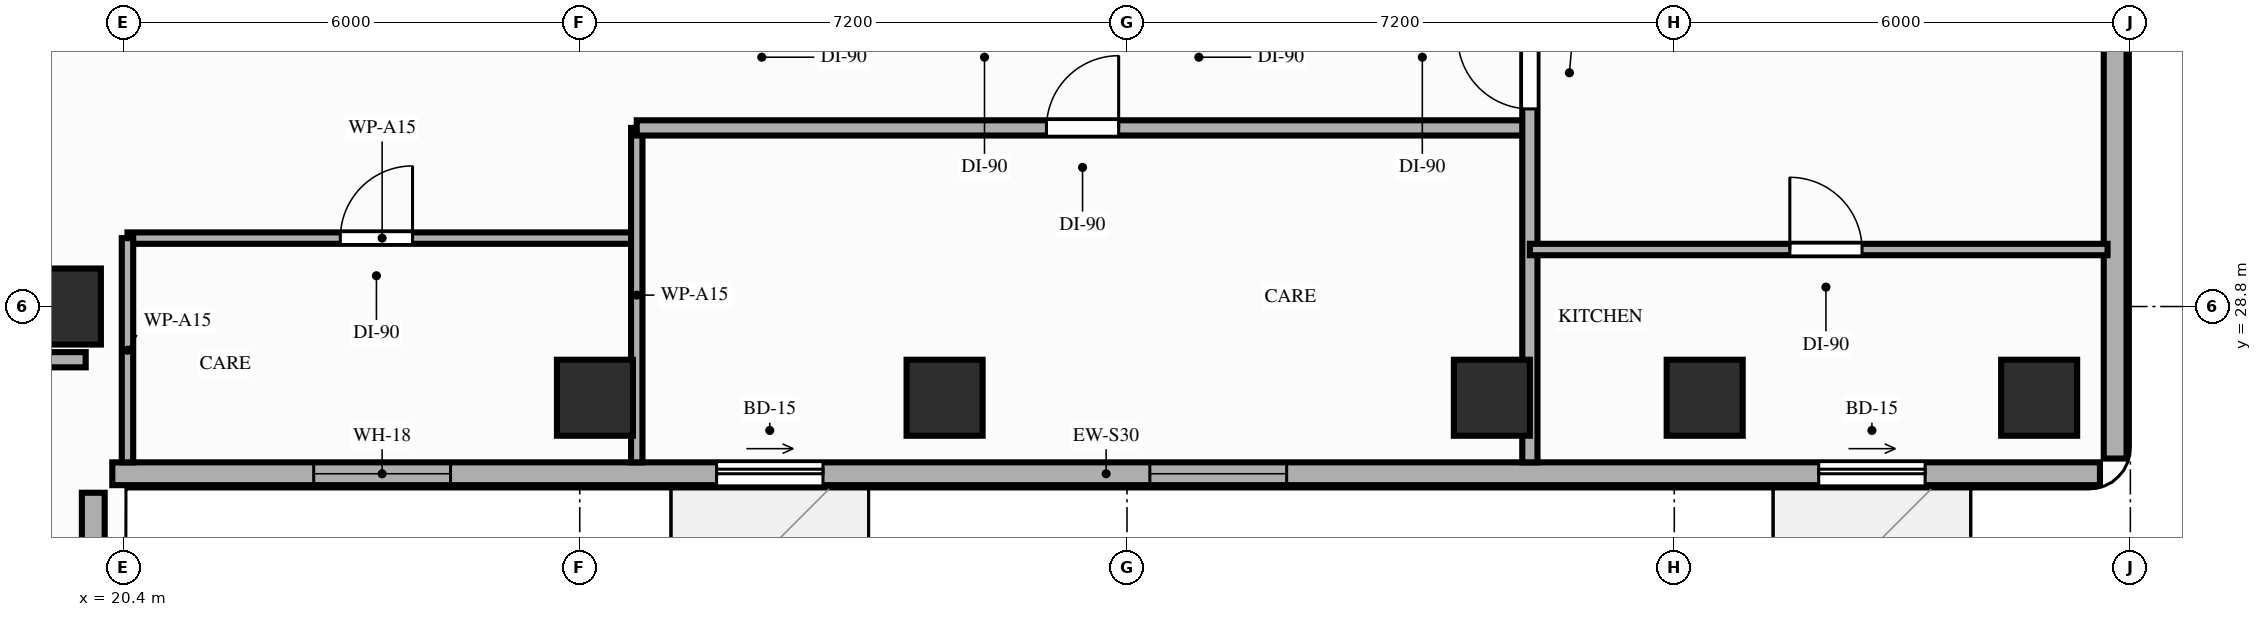
"""IFC4 building model, lengths in metres.
Left out: names, types, materials, properties, quantities, classifications, styles, units other than length and angle.
Written with IfcOpenShell. Run it as: python <this file> out.ifc"""

import sys

from ifc_helpers import new_model, si_unit, direction, frame, frame_2d, origin, origin_2d, place, context, subcontext, project, spatial, rectangle, extrude, element, fill, save


model = new_model("IFC4")
c1 = context("Model", 3, precision=1e-05, world=origin(), true_north=direction((0.0, 1.0)))
c2 = subcontext(c1, "Body", "Model", "MODEL_VIEW")
j1 = project(units=[si_unit("LENGTHUNIT", "METRE"), si_unit("PLANEANGLEUNIT", "RADIAN")], contexts=[c1])
p1 = place(None, origin())
s1 = spatial("IfcSite", under=j1, at=p1, CompositionType="ELEMENT")
p2 = place(p1, origin())
s2 = spatial("IfcBuilding", under=s1, at=p2, CompositionType="ELEMENT")
p3 = place(p2, frame((0.0, 0.0, 133.0)))
s3 = spatial("IfcBuildingStorey", under=s2, at=p3, CompositionType="ELEMENT", Elevation=133.0)
for number, where, z_axis, x_axis in (
    (1, (19.6, 28.8, 0.0), (0.0, 0.0, 1.0), (1.0, 0.0, 0.0)),
    (2, (26.6, 27.6, 0.0), (0.0, 0.0, 1.0), (1.0, 0.0, 0.0)),
    (3, (31.2, 27.6, 0.0), (0.0, 0.0, 1.0), (1.0, 0.0, 0.0)),
    (4, (38.4, 27.6, 0.0), (0.0, 0.0, 1.0), (1.0, 0.0, 0.0)),
    (5, (41.2, 27.6, 0.0), (0.0, 0.0, 1.0), (1.0, 0.0, 0.0)),
    (6, (45.6, 27.6, 0.0), (0.0, 0.0, 1.0), (1.0, 0.0, 0.0)),
):
    element("IfcColumn", number, at=place(p3, frame(where, z_axis=z_axis, x_axis=x_axis)), inside=s3, PredefinedType="COLUMN", context=c2, shape_type="SweptSolid", body=[
        extrude(rectangle(XDim=1.0, YDim=1.0, at=origin_2d()), origin(), (0.0, 0.0, 1.0), 3.2),
    ])
p4 = place(p3, frame((20.0, 8.8, 0.0), z_axis=(0.0, 0.0, 1.0), x_axis=(0.0, 1.0, 0.0)))
e7 = element("IfcWall", 7, at=p4, inside=s3, PredefinedType="STANDARD", context=c2, shape_type="SweptSolid", body=[
    extrude(rectangle(XDim=17.55, YDim=0.3, at=frame_2d((8.775, 0.0))), origin(), (0.0, 0.0, 1.0), 2.46),
])
p5 = place(p4, frame((10.32, 0.0, 0.85)))
e8 = element("IfcOpeningElement", 8, at=p5, cuts=e7, PredefinedType="OPENING", context=c2, shape_type="SweptSolid", body=[
    extrude(rectangle(XDim=1.8, YDim=1.36, at=frame_2d((0.9, 0.68))), frame((0.0, 0.16, 0.0), z_axis=(0.0, -1.0, 0.0), x_axis=(1.0, 0.0, 0.0)), (0.0, 0.0, 1.0), 0.32),
])
p6 = place(p3, frame((20.25, 26.6, 0.0), z_axis=(0.0, 0.0, 1.0), x_axis=(1.0, 0.0, 0.0)))
e9 = element("IfcWall", 9, at=p6, inside=s3, PredefinedType="STANDARD", context=c2, shape_type="SweptSolid", body=[
    extrude(rectangle(XDim=26.15, YDim=0.3, at=frame_2d((13.075, 0.0))), origin(), (0.0, 0.0, 1.0), 2.71),
])
p7 = place(p6, frame((7.95, 0.0, 0.0)))
e10 = element("IfcOpeningElement", 10, at=p7, cuts=e9, PredefinedType="OPENING", context=c2, shape_type="SweptSolid", body=[
    extrude(rectangle(XDim=1.4, YDim=2.1, at=frame_2d((0.7, 1.05))), frame((0.0, 0.16, 0.0), z_axis=(0.0, -1.0, 0.0), x_axis=(1.0, 0.0, 0.0)), (0.0, 0.0, 1.0), 0.32),
])
p8 = place(p6, frame((22.45, 0.0, 0.0)))
e11 = element("IfcOpeningElement", 11, at=p8, cuts=e9, PredefinedType="OPENING", context=c2, shape_type="SweptSolid", body=[
    extrude(rectangle(XDim=1.4, YDim=2.1, at=frame_2d((0.7, 1.05))), frame((0.0, 0.16, 0.0), z_axis=(0.0, -1.0, 0.0), x_axis=(1.0, 0.0, 0.0)), (0.0, 0.0, 1.0), 0.32),
])
p9 = place(p6, frame((2.65, 0.0, 0.85)))
e12 = element("IfcOpeningElement", 12, at=p9, cuts=e9, PredefinedType="OPENING", context=c2, shape_type="SweptSolid", body=[
    extrude(rectangle(XDim=1.8, YDim=1.61, at=frame_2d((0.9, 0.805))), frame((0.0, 0.16, 0.0), z_axis=(0.0, -1.0, 0.0), x_axis=(1.0, 0.0, 0.0)), (0.0, 0.0, 1.0), 0.32),
])
p10 = place(p6, frame((13.65, 0.0, 0.85)))
e13 = element("IfcOpeningElement", 13, at=p10, cuts=e9, PredefinedType="OPENING", context=c2, shape_type="SweptSolid", body=[
    extrude(rectangle(XDim=1.8, YDim=1.61, at=frame_2d((0.9, 0.805))), frame((0.0, 0.16, 0.0), z_axis=(0.0, -1.0, 0.0), x_axis=(1.0, 0.0, 0.0)), (0.0, 0.0, 1.0), 0.32),
])
p11 = place(p3, frame((46.6, 26.8, 0.0), z_axis=(0.0, 0.0, 1.0), x_axis=(0.0, 1.0, 0.0)))
e14 = element("IfcWall", 14, at=p11, inside=s3, PredefinedType="STANDARD", context=c2, shape_type="SweptSolid", body=[
    extrude(rectangle(XDim=15.35, YDim=0.3, at=frame_2d((7.675, 0.0))), origin(), (0.0, 0.0, 1.0), 3.02),
])
p12 = place(p11, frame((6.13, 0.0, 0.85)))
e15 = element("IfcOpeningElement", 15, at=p12, cuts=e14, PredefinedType="OPENING", context=c2, shape_type="SweptSolid", body=[
    extrude(rectangle(XDim=1.8, YDim=1.75, at=frame_2d((0.9, 0.875))), frame((0.0, 0.16, 0.0), z_axis=(0.0, -1.0, 0.0), x_axis=(1.0, 0.0, 0.0)), (0.0, 0.0, 1.0), 0.32),
])
p13 = place(p3, frame((12.91, 28.1, 0.0), z_axis=(0.0, 0.0, 1.0), x_axis=(1.0, 0.0, 0.0)))
e16 = element("IfcWall", 16, at=p13, inside=s3, PredefinedType="PARTITIONING", context=c2, shape_type="SweptSolid", body=[
    extrude(rectangle(XDim=6.99, YDim=0.2, at=frame_2d((3.495, 0.0))), origin(), (0.0, 0.0, 1.0), 2.46),
])
p14 = place(p3, frame((20.45, 29.7, 0.0), z_axis=(0.0, 0.0, 1.0), x_axis=(1.0, 0.0, 0.0)))
e17 = element("IfcWall", 17, at=p14, inside=s3, PredefinedType="PARTITIONING", context=c2, shape_type="SweptSolid", body=[
    extrude(rectangle(XDim=6.7, YDim=0.15, at=frame_2d((3.35, 0.0))), origin(), (0.0, 0.0, 1.0), 3.02),
])
p15 = place(p14, frame((2.8, 0.0, 0.0)))
e18 = element("IfcOpeningElement", 18, at=p15, cuts=e17, PredefinedType="OPENING", context=c2, shape_type="SweptSolid", body=[
    extrude(rectangle(XDim=0.95, YDim=2.15, at=frame_2d((0.475, 1.075))), frame((0.0, 0.085, 0.0), z_axis=(0.0, -1.0, 0.0), x_axis=(1.0, 0.0, 0.0)), (0.0, 0.0, 1.0), 0.17),
])
p16 = place(p3, frame((20.45, 26.75, 0.0), z_axis=(0.0, 0.0, 1.0), x_axis=(0.0, 1.0, 0.0)))
e19 = element("IfcWall", 19, at=p16, inside=s3, PredefinedType="PARTITIONING", context=c2, shape_type="SweptSolid", body=[
    extrude(rectangle(XDim=2.95, YDim=0.15, at=frame_2d((1.475, 0.0))), origin(), (0.0, 0.0, 1.0), 2.46),
])
p17 = place(p3, frame((27.15, 26.75, 0.0), z_axis=(0.0, 0.0, 1.0), x_axis=(0.0, 1.0, 0.0)))
e20 = element("IfcWall", 20, at=p17, inside=s3, PredefinedType="PARTITIONING", context=c2, shape_type="SweptSolid", body=[
    extrude(rectangle(XDim=4.4, YDim=0.15, at=frame_2d((2.2, 0.0))), origin(), (0.0, 0.0, 1.0), 2.46),
])
p18 = place(p3, frame((27.15, 31.15, 0.0), z_axis=(0.0, 0.0, 1.0), x_axis=(1.0, 0.0, 0.0)))
e21 = element("IfcWall", 21, at=p18, inside=s3, PredefinedType="PARTITIONING", context=c2, shape_type="SweptSolid", body=[
    extrude(rectangle(XDim=11.75, YDim=0.2, at=frame_2d((5.875, 0.0))), origin(), (0.0, 0.0, 1.0), 2.46),
])
p19 = place(p18, frame((5.39, 0.0, 0.0)))
e22 = element("IfcOpeningElement", 22, at=p19, cuts=e21, PredefinedType="OPENING", context=c2, shape_type="SweptSolid", body=[
    extrude(rectangle(XDim=0.95, YDim=2.15, at=frame_2d((0.475, 1.075))), frame((0.0, 0.11, 0.0), z_axis=(0.0, -1.0, 0.0), x_axis=(1.0, 0.0, 0.0)), (0.0, 0.0, 1.0), 0.22),
])
p20 = place(p3, frame((38.9, 26.75, 0.0), z_axis=(0.0, 0.0, 1.0), x_axis=(0.0, 1.0, 0.0)))
e23 = element("IfcWall", 23, at=p20, inside=s3, PredefinedType="PARTITIONING", context=c2, shape_type="SweptSolid", body=[
    extrude(rectangle(XDim=15.45, YDim=0.2, at=frame_2d((7.725, 0.0))), origin(), (0.0, 0.0, 1.0), 2.46),
])
p21 = place(p20, frame((4.65, 0.0, 0.0)))
e24 = element("IfcOpeningElement", 24, at=p21, cuts=e23, PredefinedType="OPENING", context=c2, shape_type="SweptSolid", body=[
    extrude(rectangle(XDim=0.95, YDim=2.15, at=frame_2d((0.475, 1.075))), frame((0.0, 0.11, 0.0), z_axis=(0.0, -1.0, 0.0), x_axis=(1.0, 0.0, 0.0)), (0.0, 0.0, 1.0), 0.22),
])
p22 = place(p3, frame((38.9, 29.55, 0.0), z_axis=(0.0, 0.0, 1.0), x_axis=(1.0, 0.0, 0.0)))
e25 = element("IfcWall", 25, at=p22, inside=s3, PredefinedType="PARTITIONING", context=c2, shape_type="SweptSolid", body=[
    extrude(rectangle(XDim=7.6, YDim=0.15, at=frame_2d((3.8, 0.0))), origin(), (0.0, 0.0, 1.0), 2.46),
])
p23 = place(p22, frame((3.42, 0.0, 0.0)))
e26 = element("IfcOpeningElement", 26, at=p23, cuts=e25, PredefinedType="OPENING", context=c2, shape_type="SweptSolid", body=[
    extrude(rectangle(XDim=0.95, YDim=2.15, at=frame_2d((0.475, 1.075))), frame((0.0, 0.085, 0.0), z_axis=(0.0, -1.0, 0.0), x_axis=(1.0, 0.0, 0.0)), (0.0, 0.0, 1.0), 0.17),
])
p24 = place(p7, origin())
e27 = element("IfcDoor", 27, at=p24, inside=s3, OperationType="SLIDING_TO_RIGHT", PredefinedType="DOOR", context=c2, shape_type="SweptSolid", body=[
    extrude(rectangle(XDim=1.4, YDim=2.1, at=frame_2d((0.7, 1.05))), frame((0.0, 0.025, 0.0), z_axis=(0.0, -1.0, 0.0), x_axis=(1.0, 0.0, 0.0)), (0.0, 0.0, 1.0), 0.05),
])
fill(e10, e27)
p25 = place(p8, origin())
e28 = element("IfcDoor", 28, at=p25, inside=s3, OperationType="SLIDING_TO_RIGHT", PredefinedType="DOOR", context=c2, shape_type="SweptSolid", body=[
    extrude(rectangle(XDim=1.4, YDim=2.1, at=frame_2d((0.7, 1.05))), frame((0.0, 0.025, 0.0), z_axis=(0.0, -1.0, 0.0), x_axis=(1.0, 0.0, 0.0)), (0.0, 0.0, 1.0), 0.05),
])
fill(e11, e28)
p26 = place(p9, origin())
e29 = element("IfcWindow", 29, at=p26, inside=s3, PartitioningType="SINGLE_PANEL", PredefinedType="WINDOW", context=c2, shape_type="SweptSolid", body=[
    extrude(rectangle(XDim=1.8, YDim=1.61, at=frame_2d((0.9, 0.805))), frame((0.0, 0.03, 0.0), z_axis=(0.0, -1.0, 0.0), x_axis=(1.0, 0.0, 0.0)), (0.0, 0.0, 1.0), 0.06),
])
fill(e12, e29)
p27 = place(p10, origin())
e30 = element("IfcWindow", 30, at=p27, inside=s3, PartitioningType="SINGLE_PANEL", PredefinedType="WINDOW", context=c2, shape_type="SweptSolid", body=[
    extrude(rectangle(XDim=1.8, YDim=1.61, at=frame_2d((0.9, 0.805))), frame((0.0, 0.03, 0.0), z_axis=(0.0, -1.0, 0.0), x_axis=(1.0, 0.0, 0.0)), (0.0, 0.0, 1.0), 0.06),
])
fill(e13, e30)
p28 = place(p15, origin())
e31 = element("IfcDoor", 31, at=p28, inside=s3, OperationType="SINGLE_SWING_RIGHT", PredefinedType="DOOR", context=c2, shape_type="SweptSolid", body=[
    extrude(rectangle(XDim=0.95, YDim=2.15, at=frame_2d((0.475, 1.075))), frame((0.0, 0.025, 0.0), z_axis=(0.0, -1.0, 0.0), x_axis=(1.0, 0.0, 0.0)), (0.0, 0.0, 1.0), 0.05),
])
fill(e18, e31)
p29 = place(p21, origin())
e32 = element("IfcDoor", 32, at=p29, inside=s3, OperationType="SINGLE_SWING_RIGHT", PredefinedType="DOOR", context=c2, shape_type="SweptSolid", body=[
    extrude(rectangle(XDim=0.95, YDim=2.15, at=frame_2d((0.475, 1.075))), frame((0.0, 0.025, 0.0), z_axis=(0.0, -1.0, 0.0), x_axis=(1.0, 0.0, 0.0)), (0.0, 0.0, 1.0), 0.05),
])
fill(e24, e32)
p30 = place(p23, origin())
e33 = element("IfcDoor", 33, at=p30, inside=s3, OperationType="SINGLE_SWING_LEFT", PredefinedType="DOOR", context=c2, shape_type="SweptSolid", body=[
    extrude(rectangle(XDim=0.95, YDim=2.15, at=frame_2d((0.475, 1.075))), frame((0.0, 0.025, 0.0), z_axis=(0.0, -1.0, 0.0), x_axis=(1.0, 0.0, 0.0)), (0.0, 0.0, 1.0), 0.05),
])
fill(e26, e33)
p31 = place(p19, origin())
e34 = element("IfcDoor", 34, at=p31, inside=s3, OperationType="SINGLE_SWING_RIGHT", PredefinedType="DOOR", context=c2, shape_type="SweptSolid", body=[
    extrude(rectangle(XDim=0.95, YDim=2.15, at=frame_2d((0.475, 1.075))), frame((0.0, 0.025, 0.0), z_axis=(0.0, -1.0, 0.0), x_axis=(1.0, 0.0, 0.0)), (0.0, 0.0, 1.0), 0.05),
])
fill(e22, e34)
save(model, sys.argv[1])
